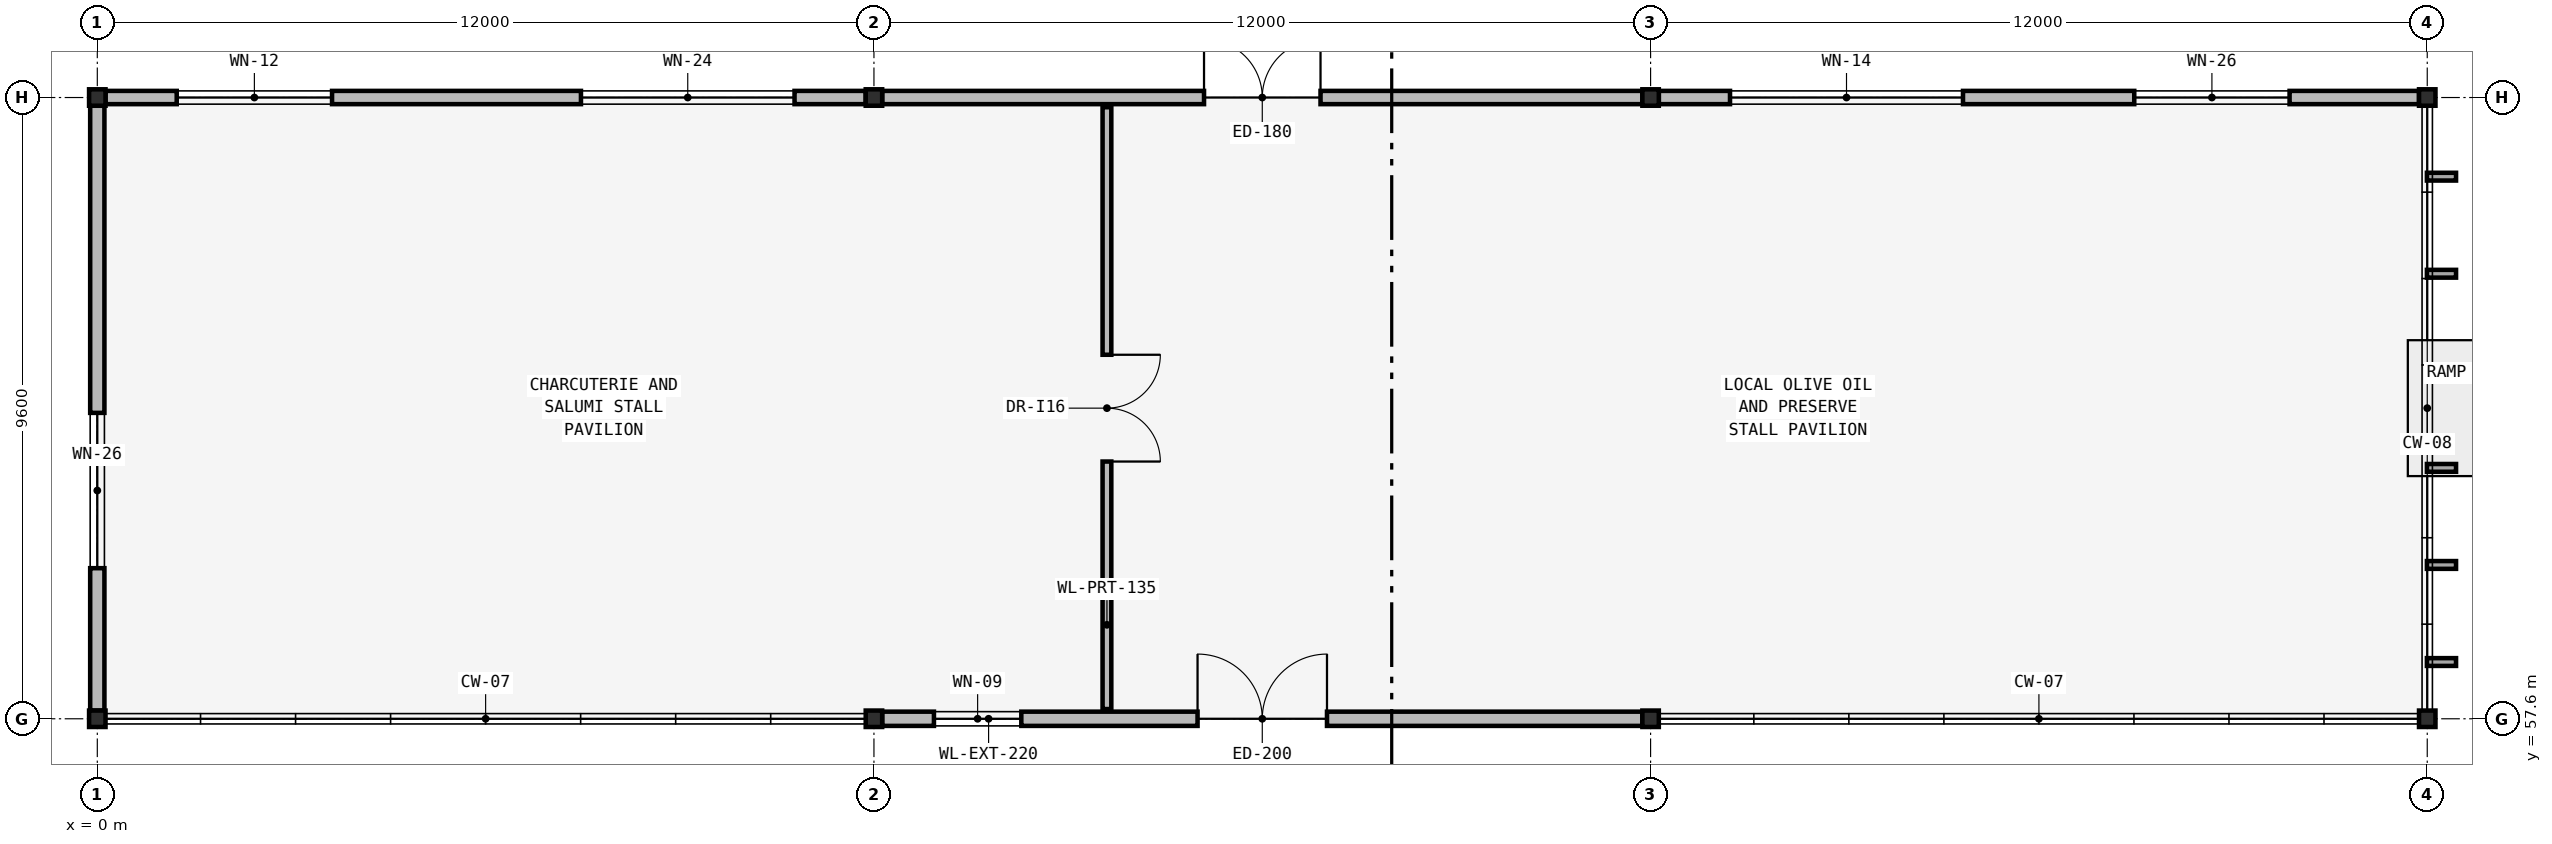
"""IFC4 building model, lengths in metres.
Left out: names, types, materials, properties, quantities, classifications, styles, units other than length and angle.
Written with IfcOpenShell. Run it as: python <this file> out.ifc"""

import sys

from ifc_helpers import new_model, si_unit, direction, frame, frame_2d, origin, origin_2d, place, context, subcontext, project, spatial, rectangle, i_section, extrude, element, fill, save


model = new_model("IFC4")
c1 = context("Model", 3, precision=1e-05, world=origin(), true_north=direction((0.0, 1.0)))
c2 = subcontext(c1, "Body", "Model", "MODEL_VIEW")
j1 = project(units=[si_unit("LENGTHUNIT", "METRE"), si_unit("PLANEANGLEUNIT", "RADIAN")], contexts=[c1])
p1 = place(None, origin())
s1 = spatial("IfcSite", under=j1, at=p1, CompositionType="ELEMENT")
p2 = place(p1, origin())
s2 = spatial("IfcBuilding", under=s1, at=p2, CompositionType="ELEMENT")
p3 = place(p2, origin())
s3 = spatial("IfcBuildingStorey", under=s2, at=p3, CompositionType="ELEMENT", Elevation=0.0)
for number, where, z_axis, x_axis in (
    (1, (0.0, 57.6, -0.255), (0.0, 0.0, 1.0), (1.0, 0.0, 0.0)),
    (2, (12.0, 57.6, -0.255), (0.0, 0.0, 1.0), (1.0, 0.0, 0.0)),
    (3, (24.0, 57.6, -0.255), (0.0, 0.0, 1.0), (1.0, 0.0, 0.0)),
    (4, (36.0, 57.6, -0.255), (0.0, 0.0, 1.0), (1.0, 0.0, 0.0)),
    (5, (0.0, 67.2, -0.255), (0.0, 0.0, 1.0), (1.0, 0.0, 0.0)),
    (6, (12.0, 67.2, -0.255), (0.0, 0.0, 1.0), (1.0, 0.0, 0.0)),
    (7, (24.0, 67.2, -0.255), (0.0, 0.0, 1.0), (1.0, 0.0, 0.0)),
    (8, (36.0, 67.2, -0.255), (0.0, 0.0, 1.0), (1.0, 0.0, 0.0)),
):
    element("IfcColumn", number, at=place(p3, frame(where, z_axis=z_axis, x_axis=x_axis)), inside=s3, PredefinedType="COLUMN", context=c2, shape_type="SweptSolid", body=[
        extrude(i_section(OverallWidth=0.254, OverallDepth=0.254, WebThickness=0.009, FlangeThickness=0.014, at=origin_2d()), origin(), (0.0, 0.0, 1.0), 5.655),
    ])
p4 = place(p3, frame((0.127, 67.2, 0.0), z_axis=(0.0, 0.0, 1.0), x_axis=(1.0, 0.0, 0.0)))
e9 = element("IfcWall", 9, at=p4, inside=s3, PredefinedType="SOLIDWALL", context=c2, shape_type="SweptSolid", body=[
    extrude(rectangle(XDim=11.746, YDim=0.205, at=frame_2d((5.873, 0.0))), origin(), (0.0, 0.0, 1.0), 4.551),
])
p5 = place(p4, frame((1.1, 0.0, 0.8)))
e10 = element("IfcOpeningElement", 10, at=p5, cuts=e9, PredefinedType="OPENING", context=c2, shape_type="SweptSolid", body=[
    extrude(rectangle(XDim=2.4, YDim=2.1, at=frame_2d((1.2, 1.05))), frame((0.0, 0.117, 0.0), z_axis=(0.0, -1.0, 0.0), x_axis=(1.0, 0.0, 0.0)), (0.0, 0.0, 1.0), 0.235),
])
p6 = place(p4, frame((7.346, 0.0, 1.3)))
e11 = element("IfcOpeningElement", 11, at=p6, cuts=e9, PredefinedType="OPENING", context=c2, shape_type="SweptSolid", body=[
    extrude(rectangle(XDim=3.3, YDim=1.2, at=frame_2d((1.65, 0.6))), frame((0.0, 0.117, 0.0), z_axis=(0.0, -1.0, 0.0), x_axis=(1.0, 0.0, 0.0)), (0.0, 0.0, 1.0), 0.235),
])
p7 = place(p3, frame((12.127, 57.6, 0.0), z_axis=(0.0, 0.0, 1.0), x_axis=(1.0, 0.0, 0.0)))
e12 = element("IfcWall", 12, at=p7, inside=s3, PredefinedType="SOLIDWALL", context=c2, shape_type="SweptSolid", body=[
    extrude(rectangle(XDim=11.746, YDim=0.22, at=frame_2d((5.873, 0.0))), origin(), (0.0, 0.0, 1.0), 4.551),
])
p8 = place(p7, frame((4.873, 0.0, 0.0)))
e13 = element("IfcOpeningElement", 13, at=p8, cuts=e12, PredefinedType="OPENING", context=c2, shape_type="SweptSolid", body=[
    extrude(rectangle(XDim=2.0, YDim=2.3, at=frame_2d((1.0, 1.15))), frame((0.0, 0.125, 0.0), z_axis=(0.0, -1.0, 0.0), x_axis=(1.0, 0.0, 0.0)), (0.0, 0.0, 1.0), 0.25),
])
p9 = place(p7, frame((0.8, 0.0, 0.8)))
e14 = element("IfcOpeningElement", 14, at=p9, cuts=e12, PredefinedType="OPENING", context=c2, shape_type="SweptSolid", body=[
    extrude(rectangle(XDim=1.35, YDim=2.1, at=frame_2d((0.675, 1.05))), frame((0.0, 0.125, 0.0), z_axis=(0.0, -1.0, 0.0), x_axis=(1.0, 0.0, 0.0)), (0.0, 0.0, 1.0), 0.25),
])
p10 = place(p3, frame((12.127, 67.2, 0.0), z_axis=(0.0, 0.0, 1.0), x_axis=(1.0, 0.0, 0.0)))
e15 = element("IfcWall", 15, at=p10, inside=s3, PredefinedType="SOLIDWALL", context=c2, shape_type="SweptSolid", body=[
    extrude(rectangle(XDim=11.746, YDim=0.205, at=frame_2d((5.873, 0.0))), origin(), (0.0, 0.0, 1.0), 4.551),
])
p11 = place(p10, frame((4.973, 0.0, 0.0)))
e16 = element("IfcOpeningElement", 16, at=p11, cuts=e15, PredefinedType="OPENING", context=c2, shape_type="SweptSolid", body=[
    extrude(rectangle(XDim=1.8, YDim=2.3, at=frame_2d((0.9, 1.15))), frame((0.0, 0.117, 0.0), z_axis=(0.0, -1.0, 0.0), x_axis=(1.0, 0.0, 0.0)), (0.0, 0.0, 1.0), 0.235),
])
p12 = place(p3, frame((24.127, 67.2, 0.0), z_axis=(0.0, 0.0, 1.0), x_axis=(1.0, 0.0, 0.0)))
e17 = element("IfcWall", 17, at=p12, inside=s3, PredefinedType="SOLIDWALL", context=c2, shape_type="SweptSolid", body=[
    extrude(rectangle(XDim=11.746, YDim=0.205, at=frame_2d((5.873, 0.0))), origin(), (0.0, 0.0, 1.0), 4.551),
])
p13 = place(p12, frame((1.1, 0.0, 0.8)))
e18 = element("IfcOpeningElement", 18, at=p13, cuts=e17, PredefinedType="OPENING", context=c2, shape_type="SweptSolid", body=[
    extrude(rectangle(XDim=3.6, YDim=2.1, at=frame_2d((1.8, 1.05))), frame((0.0, 0.117, 0.0), z_axis=(0.0, -1.0, 0.0), x_axis=(1.0, 0.0, 0.0)), (0.0, 0.0, 1.0), 0.235),
])
p14 = place(p12, frame((7.346, 0.0, 0.6)))
e19 = element("IfcOpeningElement", 19, at=p14, cuts=e17, PredefinedType="OPENING", context=c2, shape_type="SweptSolid", body=[
    extrude(rectangle(XDim=2.4, YDim=2.4, at=frame_2d((1.2, 1.2))), frame((0.0, 0.117, 0.0), z_axis=(0.0, -1.0, 0.0), x_axis=(1.0, 0.0, 0.0)), (0.0, 0.0, 1.0), 0.235),
])
p15 = place(p3, frame((0.0, 57.727, 0.0), z_axis=(0.0, 0.0, 1.0), x_axis=(0.0, 1.0, 0.0)))
e20 = element("IfcWall", 20, at=p15, inside=s3, PredefinedType="SOLIDWALL", context=c2, shape_type="SweptSolid", body=[
    extrude(rectangle(XDim=9.346, YDim=0.22, at=frame_2d((4.673, 0.0))), origin(), (0.0, 0.0, 1.0), 4.551),
])
p16 = place(p15, frame((2.2, 0.0, 0.6)))
e21 = element("IfcOpeningElement", 21, at=p16, cuts=e20, PredefinedType="OPENING", context=c2, shape_type="SweptSolid", body=[
    extrude(rectangle(XDim=2.4, YDim=2.4, at=frame_2d((1.2, 1.2))), frame((0.0, 0.125, 0.0), z_axis=(0.0, -1.0, 0.0), x_axis=(1.0, 0.0, 0.0)), (0.0, 0.0, 1.0), 0.25),
])
p17 = place(p3, frame((15.6, 57.75, 0.0), z_axis=(0.0, 0.0, 1.0), x_axis=(0.0, 1.0, 0.0)))
e22 = element("IfcWall", 22, at=p17, inside=s3, PredefinedType="PARTITIONING", context=c2, shape_type="SweptSolid", body=[
    extrude(rectangle(XDim=9.3, YDim=0.135, at=frame_2d((4.65, 0.0))), origin(), (0.0, 0.0, 1.0), 5.08),
])
p18 = place(p17, frame((3.825, 0.0, 0.0)))
e23 = element("IfcOpeningElement", 23, at=p18, cuts=e22, PredefinedType="OPENING", context=c2, shape_type="SweptSolid", body=[
    extrude(rectangle(XDim=1.65, YDim=2.2, at=frame_2d((0.825, 1.1))), frame((0.0, 0.083, 0.0), z_axis=(0.0, -1.0, 0.0), x_axis=(1.0, 0.0, 0.0)), (0.0, 0.0, 1.0), 0.165),
])
p19 = place(p5, origin())
e24 = element("IfcWindow", 24, at=p19, inside=s3, PartitioningType="SINGLE_PANEL", PredefinedType="WINDOW", context=c2, shape_type="SweptSolid", body=[
    extrude(rectangle(XDim=2.4, YDim=2.1, at=frame_2d((1.2, 1.05))), frame((0.0, 0.03, 0.0), z_axis=(0.0, -1.0, 0.0), x_axis=(1.0, 0.0, 0.0)), (0.0, 0.0, 1.0), 0.06),
])
fill(e10, e24)
p20 = place(p6, origin())
e25 = element("IfcWindow", 25, at=p20, inside=s3, PartitioningType="SINGLE_PANEL", PredefinedType="WINDOW", context=c2, shape_type="SweptSolid", body=[
    extrude(rectangle(XDim=3.3, YDim=1.2, at=frame_2d((1.65, 0.6))), frame((0.0, 0.03, 0.0), z_axis=(0.0, -1.0, 0.0), x_axis=(1.0, 0.0, 0.0)), (0.0, 0.0, 1.0), 0.06),
])
fill(e11, e25)
p21 = place(p8, frame((2.0, 0.0, 0.0), z_axis=(0.0, 0.0, 1.0), x_axis=(-1.0, 0.0, 0.0)))
e26 = element("IfcDoor", 26, at=p21, inside=s3, OperationType="DOUBLE_DOOR_SINGLE_SWING", PredefinedType="DOOR", context=c2, shape_type="SweptSolid", body=[
    extrude(rectangle(XDim=2.0, YDim=2.3, at=frame_2d((1.0, 1.15))), frame((0.0, 0.025, 0.0), z_axis=(0.0, -1.0, 0.0), x_axis=(1.0, 0.0, 0.0)), (0.0, 0.0, 1.0), 0.05),
])
fill(e13, e26)
p22 = place(p9, origin())
e27 = element("IfcWindow", 27, at=p22, inside=s3, PartitioningType="SINGLE_PANEL", PredefinedType="WINDOW", context=c2, shape_type="SweptSolid", body=[
    extrude(rectangle(XDim=1.35, YDim=2.1, at=frame_2d((0.675, 1.05))), frame((0.0, 0.03, 0.0), z_axis=(0.0, -1.0, 0.0), x_axis=(1.0, 0.0, 0.0)), (0.0, 0.0, 1.0), 0.06),
])
fill(e14, e27)
p23 = place(p11, origin())
e28 = element("IfcDoor", 28, at=p23, inside=s3, OperationType="DOUBLE_DOOR_SINGLE_SWING", PredefinedType="DOOR", context=c2, shape_type="SweptSolid", body=[
    extrude(rectangle(XDim=1.8, YDim=2.3, at=frame_2d((0.9, 1.15))), frame((0.0, 0.025, 0.0), z_axis=(0.0, -1.0, 0.0), x_axis=(1.0, 0.0, 0.0)), (0.0, 0.0, 1.0), 0.05),
])
fill(e16, e28)
p24 = place(p13, origin())
e29 = element("IfcWindow", 29, at=p24, inside=s3, PartitioningType="SINGLE_PANEL", PredefinedType="WINDOW", context=c2, shape_type="SweptSolid", body=[
    extrude(rectangle(XDim=3.6, YDim=2.1, at=frame_2d((1.8, 1.05))), frame((0.0, 0.03, 0.0), z_axis=(0.0, -1.0, 0.0), x_axis=(1.0, 0.0, 0.0)), (0.0, 0.0, 1.0), 0.06),
])
fill(e18, e29)
p25 = place(p14, origin())
e30 = element("IfcWindow", 30, at=p25, inside=s3, PartitioningType="SINGLE_PANEL", PredefinedType="WINDOW", context=c2, shape_type="SweptSolid", body=[
    extrude(rectangle(XDim=2.4, YDim=2.4, at=frame_2d((1.2, 1.2))), frame((0.0, 0.03, 0.0), z_axis=(0.0, -1.0, 0.0), x_axis=(1.0, 0.0, 0.0)), (0.0, 0.0, 1.0), 0.06),
])
fill(e19, e30)
p26 = place(p16, origin())
e31 = element("IfcWindow", 31, at=p26, inside=s3, PartitioningType="SINGLE_PANEL", PredefinedType="WINDOW", context=c2, shape_type="SweptSolid", body=[
    extrude(rectangle(XDim=2.4, YDim=2.4, at=frame_2d((1.2, 1.2))), frame((0.0, 0.03, 0.0), z_axis=(0.0, -1.0, 0.0), x_axis=(1.0, 0.0, 0.0)), (0.0, 0.0, 1.0), 0.06),
])
fill(e21, e31)
p27 = place(p18, origin())
e32 = element("IfcDoor", 32, at=p27, inside=s3, OperationType="DOUBLE_DOOR_SINGLE_SWING", PredefinedType="DOOR", context=c2, shape_type="SweptSolid", body=[
    extrude(rectangle(XDim=1.65, YDim=2.2, at=frame_2d((0.825, 1.1))), frame((0.0, 0.025, 0.0), z_axis=(0.0, -1.0, 0.0), x_axis=(1.0, 0.0, 0.0)), (0.0, 0.0, 1.0), 0.05),
])
fill(e23, e32)
save(model, sys.argv[1])
